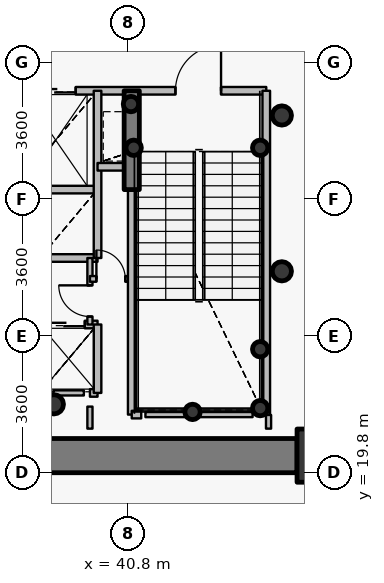
"""IFC4 building model, lengths in metres.
Left out: names, types, materials, properties, quantities, classifications, styles, units other than length and angle.
Written with IfcOpenShell. Run it as: python <this file> out.ifc"""

import sys

from ifc_helpers import new_model, si_unit, direction, frame, frame_2d, origin, origin_2d, place, context, subcontext, project, spatial, rectangle, hollow_circle, extrude, source, transform, mapped, element, fill, save


model = new_model("IFC4")
c1 = context("Model", 3, precision=1e-05, world=origin(), true_north=direction((0.0, 1.0)))
c2 = subcontext(c1, "Body", "Model", "MODEL_VIEW")
j1 = project(units=[si_unit("LENGTHUNIT", "METRE"), si_unit("PLANEANGLEUNIT", "RADIAN")], contexts=[c1])
p1 = place(None, origin())
s1 = spatial("IfcSite", under=j1, at=p1, CompositionType="ELEMENT")
p2 = place(p1, origin())
s2 = spatial("IfcBuilding", under=s1, at=p2, CompositionType="ELEMENT")
p3 = place(p2, frame((0.0, 0.0, 78.6)))
s3 = spatial("IfcBuildingStorey", under=s2, at=p3, CompositionType="ELEMENT", Elevation=78.6)
p4 = place(p3, frame((45.95, 20.25, 0.0), z_axis=(0.0, 0.0, 1.0), x_axis=(1.0, 0.0, 0.0)))
e1 = element("IfcColumn", 1, at=p4, inside=s3, PredefinedType="COLUMN", context=c2, shape_type="SweptSolid", body=[
    extrude(rectangle(XDim=1.4, YDim=1.4, at=origin_2d()), origin(), (0.0, 0.0, 1.0), 4.2),
])
p5 = place(p3, frame((38.85, 21.6, 0.0), z_axis=(0.0, 0.0, 1.0), x_axis=(1.0, 0.0, 0.0)))
e2 = element("IfcColumn", 2, at=p5, inside=s3, PredefinedType="COLUMN", context=c2, shape_type="SweptSolid", body=[
    extrude(hollow_circle(Radius=0.254, WallThickness=0.02, at=origin_2d()), origin(), (0.0, 0.0, 1.0), 4.2),
])
for number, where, z_axis, x_axis in (
    (3, (44.28, 21.5, 0.0), (0.0, 0.0, 1.0), (1.0, 0.0, 0.0)),
    (4, (44.28, 23.05, 0.0), (0.0, 0.0, 1.0), (1.0, 0.0, 0.0)),
    (5, (42.5, 21.4, 0.0), (0.0, 0.0, 1.0), (1.0, 0.0, 0.0)),
    (6, (40.95, 28.35, 0.0), (0.0, 0.0, 1.0), (1.0, 0.0, 0.0)),
    (7, (44.28, 28.35, 0.0), (0.0, 0.0, 1.0), (1.0, 0.0, 0.0)),
    (8, (40.88, 29.5, 0.0), (0.0, 0.0, 1.0), (1.0, 0.0, 0.0)),
):
    element("IfcColumn", number, at=place(p3, frame(where, z_axis=z_axis, x_axis=x_axis)), inside=s3, PredefinedType="COLUMN", context=c2, shape_type="SweptSolid", body=[
        extrude(hollow_circle(Radius=0.203, WallThickness=0.016, at=origin_2d()), origin(), (0.0, 0.0, 1.0), 4.2),
    ])
p6 = place(p3, frame((45.25, 20.25, 0.0), z_axis=(0.0, 0.0, 1.0), x_axis=(-1.0, 0.0, 0.0)))
e9 = element("IfcWall", 9, at=p6, inside=s3, PredefinedType="SHEAR", context=c2, shape_type="SweptSolid", body=[
    extrude(rectangle(XDim=18.5, YDim=0.9, at=frame_2d((9.25, 0.0))), origin(), (0.0, 0.0, 1.0), 3.4),
])
p7 = place(p6, frame((10.0, 0.0, 0.0)))
e10 = element("IfcOpeningElement", 10, at=p7, cuts=e9, PredefinedType="OPENING", context=c2, shape_type="SweptSolid", body=[
    extrude(rectangle(XDim=1.15, YDim=2.15, at=origin_2d()), frame((0.575, 0.46, 1.075), z_axis=(0.0, -1.0, 0.0), x_axis=(1.0, 0.0, 0.0)), (0.0, 0.0, 1.0), 0.92),
])
p8 = place(p3, frame((40.9, 27.25, 0.0), z_axis=(0.0, 0.0, 1.0), x_axis=(0.0, 1.0, 0.0)))
e11 = element("IfcWall", 11, at=p8, inside=s3, PredefinedType="SHEAR", context=c2, shape_type="SweptSolid", body=[
    extrude(rectangle(XDim=2.6, YDim=0.4, at=frame_2d((1.3, 0.0))), origin(), (0.0, 0.0, 1.0), 3.55),
])
for number, where, z_axis, x_axis in (
    (12, (44.85, 25.1, 0.0), (0.0, 0.0, 1.0), (1.0, 0.0, 0.0)),
    (13, (44.85, 29.2, 0.0), (0.0, 0.0, 1.0), (1.0, 0.0, 0.0)),
):
    element("IfcColumn", number, at=place(p3, frame(where, z_axis=z_axis, x_axis=x_axis)), inside=s3, PredefinedType="COLUMN", context=c2, shape_type="SweptSolid", body=[
        extrude(hollow_circle(Radius=0.254, WallThickness=0.02, at=origin_2d()), origin(), (0.0, 0.0, 1.0), 4.2),
    ])
p9 = place(p3, frame((35.05, 27.25, 0.0), z_axis=(0.0, 0.0, 1.0), x_axis=(1.0, 0.0, 0.0)))
e14 = element("IfcWall", 14, at=p9, inside=s3, PredefinedType="PARTITIONING", context=c2, shape_type="SweptSolid", body=[
    extrude(rectangle(XDim=4.95, YDim=0.2, at=frame_2d((2.475, 0.0))), origin(), (0.0, 0.0, 1.0), 3.535),
])
p10 = place(p3, frame((35.45, 23.7, 0.0), z_axis=(0.0, 0.0, 1.0), x_axis=(1.0, 0.0, 0.0)))
e15 = element("IfcWall", 15, at=p10, inside=s3, PredefinedType="PARTITIONING", context=c2, shape_type="SweptSolid", body=[
    extrude(rectangle(XDim=4.55, YDim=0.2, at=frame_2d((2.275, 0.0))), origin(), (0.0, 0.0, 1.0), 3.535),
])
p11 = place(p10, frame((0.25, 0.0, 0.0)))
e16 = element("IfcOpeningElement", 16, at=p11, cuts=e15, PredefinedType="OPENING", context=c2, shape_type="SweptSolid", body=[
    extrude(rectangle(XDim=1.05, YDim=2.15, at=origin_2d()), frame((0.525, 0.11, 1.075), z_axis=(0.0, -1.0, 0.0), x_axis=(1.0, 0.0, 0.0)), (0.0, 0.0, 1.0), 0.22),
])
p12 = place(p10, frame((1.745, 0.0, 0.0)))
e17 = element("IfcOpeningElement", 17, at=p12, cuts=e15, PredefinedType="OPENING", context=c2, shape_type="SweptSolid", body=[
    extrude(rectangle(XDim=1.05, YDim=2.15, at=origin_2d()), frame((0.525, 0.11, 1.075), z_axis=(0.0, -1.0, 0.0), x_axis=(1.0, 0.0, 0.0)), (0.0, 0.0, 1.0), 0.22),
])
p13 = place(p10, frame((3.165, 0.0, 0.0)))
e18 = element("IfcOpeningElement", 18, at=p13, cuts=e15, PredefinedType="OPENING", context=c2, shape_type="SweptSolid", body=[
    extrude(rectangle(XDim=1.05, YDim=2.15, at=origin_2d()), frame((0.525, 0.11, 1.075), z_axis=(0.0, -1.0, 0.0), x_axis=(1.0, 0.0, 0.0)), (0.0, 0.0, 1.0), 0.22),
])
p14 = place(p3, frame((35.45, 25.45, 0.0), z_axis=(0.0, 0.0, 1.0), x_axis=(1.0, 0.0, 0.0)))
e19 = element("IfcWall", 19, at=p14, inside=s3, PredefinedType="PARTITIONING", context=c2, shape_type="SweptSolid", body=[
    extrude(rectangle(XDim=4.55, YDim=0.2, at=frame_2d((2.275, 0.0))), origin(), (0.0, 0.0, 1.0), 3.535),
])
p15 = place(p3, frame((35.95, 29.85, 0.0), z_axis=(0.0, 0.0, 1.0), x_axis=(1.0, 0.0, 0.0)))
e20 = element("IfcWall", 20, at=p15, inside=s3, PredefinedType="PARTITIONING", context=c2, shape_type="SweptSolid", body=[
    extrude(rectangle(XDim=8.49, YDim=0.2, at=frame_2d((4.245, 0.0))), origin(), (0.0, 0.0, 1.0), 3.535),
])
p16 = place(p15, frame((6.1, 0.0, 0.0)))
e21 = element("IfcOpeningElement", 21, at=p16, cuts=e20, PredefinedType="OPENING", context=c2, shape_type="SweptSolid", body=[
    extrude(rectangle(XDim=1.2, YDim=2.15, at=origin_2d()), frame((0.6, 0.11, 1.075), z_axis=(0.0, -1.0, 0.0), x_axis=(1.0, 0.0, 0.0)), (0.0, 0.0, 1.0), 0.22),
])
p17 = place(p15, frame((0.37, 0.0, 0.0)))
e22 = element("IfcOpeningElement", 22, at=p17, cuts=e20, PredefinedType="OPENING", context=c2, shape_type="SweptSolid", body=[
    extrude(rectangle(XDim=1.15, YDim=2.15, at=origin_2d()), frame((0.575, 0.11, 1.075), z_axis=(0.0, -1.0, 0.0), x_axis=(1.0, 0.0, 0.0)), (0.0, 0.0, 1.0), 0.22),
])
p18 = place(p15, frame((2.425, 0.0, 0.0)))
e23 = element("IfcOpeningElement", 23, at=p18, cuts=e20, PredefinedType="OPENING", context=c2, shape_type="SweptSolid", body=[
    extrude(rectangle(XDim=1.05, YDim=2.15, at=origin_2d()), frame((0.525, 0.11, 1.075), z_axis=(0.0, -1.0, 0.0), x_axis=(1.0, 0.0, 0.0)), (0.0, 0.0, 1.0), 0.22),
])
p19 = place(p3, frame((39.8, 21.9, 0.0), z_axis=(0.0, 0.0, 1.0), x_axis=(1.0, 0.0, 0.0)))
e24 = element("IfcWall", 24, at=p19, inside=s3, PredefinedType="PARTITIONING", context=c2, shape_type="SweptSolid", body=[
    extrude(rectangle(XDim=0.2, YDim=0.2, at=frame_2d((0.1, 0.0))), origin(), (0.0, 0.0, 1.0), 3.95),
])
p20 = place(p3, frame((39.8, 23.7, 0.0), z_axis=(0.0, 0.0, 1.0), x_axis=(0.0, 1.0, 0.0)))
e25 = element("IfcWall", 25, at=p20, inside=s3, PredefinedType="PARTITIONING", context=c2, shape_type="SweptSolid", body=[
    extrude(rectangle(XDim=1.75, YDim=0.135, at=frame_2d((0.875, 0.0))), origin(), (0.0, 0.0, 1.0), 3.95),
])
p21 = place(p20, frame((0.21, 0.0, 0.0)))
e26 = element("IfcOpeningElement", 26, at=p21, cuts=e25, PredefinedType="OPENING", context=c2, shape_type="SweptSolid", body=[
    extrude(rectangle(XDim=0.82, YDim=2.1, at=origin_2d()), frame((0.41, 0.078, 1.05), z_axis=(0.0, -1.0, 0.0), x_axis=(1.0, 0.0, 0.0)), (0.0, 0.0, 1.0), 0.155),
])
p22 = place(p3, frame((39.8, 24.9, 0.0), z_axis=(0.0, 0.0, 1.0), x_axis=(1.0, 0.0, 0.0)))
e27 = element("IfcWall", 27, at=p22, inside=s3, PredefinedType="PARTITIONING", context=c2, shape_type="SweptSolid", body=[
    extrude(rectangle(XDim=1.1, YDim=0.15, at=frame_2d((0.55, 0.0))), origin(), (0.0, 0.0, 1.0), 3.95),
])
p23 = place(p22, frame((0.17, 0.0, 0.0)))
e28 = element("IfcOpeningElement", 28, at=p23, cuts=e27, PredefinedType="OPENING", context=c2, shape_type="SweptSolid", body=[
    extrude(rectangle(XDim=0.76, YDim=2.1, at=origin_2d()), frame((0.38, 0.085, 1.05), z_axis=(0.0, -1.0, 0.0), x_axis=(1.0, 0.0, 0.0)), (0.0, 0.0, 1.0), 0.17),
])
p24 = place(p3, frame((40.0, 21.9, 0.0), z_axis=(0.0, 0.0, 1.0), x_axis=(0.0, 1.0, 0.0)))
e29 = element("IfcWall", 29, at=p24, inside=s3, PredefinedType="PARTITIONING", context=c2, shape_type="SweptSolid", body=[
    extrude(rectangle(XDim=1.8, YDim=0.2, at=frame_2d((0.9, 0.0))), origin(), (0.0, 0.0, 1.0), 3.95),
])
p25 = place(p3, frame((40.0, 25.45, 0.0), z_axis=(0.0, 0.0, 1.0), x_axis=(0.0, 1.0, 0.0)))
e30 = element("IfcWall", 30, at=p25, inside=s3, PredefinedType="PARTITIONING", context=c2, shape_type="SweptSolid", body=[
    extrude(rectangle(XDim=4.4, YDim=0.2, at=frame_2d((2.2, 0.0))), origin(), (0.0, 0.0, 1.0), 3.95),
])
p26 = place(p3, frame((40.0, 27.85, 0.0), z_axis=(0.0, 0.0, 1.0), x_axis=(1.0, 0.0, 0.0)))
e31 = element("IfcWall", 31, at=p26, inside=s3, PredefinedType="PARTITIONING", context=c2, shape_type="SweptSolid", body=[
    extrude(rectangle(XDim=0.9, YDim=0.2, at=frame_2d((0.45, 0.0))), origin(), (0.0, 0.0, 1.0), 3.95),
])
p27 = place(p3, frame((40.9, 21.33, 0.0), z_axis=(0.0, 0.0, 1.0), x_axis=(0.0, 1.0, 0.0)))
e32 = element("IfcWall", 32, at=p27, inside=s3, PredefinedType="PARTITIONING", context=c2, shape_type="SweptSolid", body=[
    extrude(rectangle(XDim=5.91, YDim=0.2, at=frame_2d((2.955, 0.0))), origin(), (0.0, 0.0, 1.0), 3.485),
])
p28 = place(p3, frame((40.9, 21.33, 0.0), z_axis=(0.0, 0.0, 1.0), x_axis=(1.0, 0.0, 0.0)))
e33 = element("IfcWall", 33, at=p28, inside=s3, PredefinedType="PARTITIONING", context=c2, shape_type="SweptSolid", body=[
    extrude(rectangle(XDim=0.25, YDim=0.2, at=frame_2d((0.125, 0.0))), origin(), (0.0, 0.0, 1.0), 3.485),
])
p29 = place(p3, frame((44.44, 21.33, 0.0), z_axis=(0.0, 0.0, 1.0), x_axis=(0.0, 1.0, 0.0)))
e34 = element("IfcWall", 34, at=p29, inside=s3, PredefinedType="PARTITIONING", context=c2, shape_type="SweptSolid", body=[
    extrude(rectangle(XDim=8.52, YDim=0.2, at=frame_2d((4.26, 0.0))), origin(), (0.0, 0.0, 1.0), 3.95),
])
p30 = place(p3, frame((44.08, 21.33, 0.0), z_axis=(0.0, 0.0, 1.0), x_axis=(-1.0, 0.0, 0.0)))
e35 = element("IfcWall", 35, at=p30, inside=s3, PredefinedType="PARTITIONING", context=c2, shape_type="SweptSolid", body=[
    extrude(rectangle(XDim=2.82, YDim=0.135, at=frame_2d((1.41, 0.0))), origin(), (0.0, 0.0, 1.0), 3.485),
])
p31 = place(p3, frame((39.64, 21.9, 0.0), z_axis=(0.0, 0.0, 1.0), x_axis=(-1.0, 0.0, 0.0)))
e36 = element("IfcWall", 36, at=p31, inside=s3, PredefinedType="PARTITIONING", context=c2, shape_type="SweptSolid", body=[
    extrude(rectangle(XDim=0.8, YDim=0.135, at=frame_2d((0.4, 0.0))), origin(), (0.0, 0.0, 1.0), 3.535),
])
p32 = place(p3, frame((39.8, 20.96, 0.0), z_axis=(0.0, 0.0, 1.0), x_axis=(0.0, 1.0, 0.0)))
e37 = element("IfcWall", 37, at=p32, inside=s3, PredefinedType="PARTITIONING", context=c2, shape_type="SweptSolid", body=[
    extrude(rectangle(XDim=0.58, YDim=0.135, at=frame_2d((0.29, 0.0))), origin(), (0.0, 0.0, 1.0), 3.485),
])
p33 = place(p3, frame((44.5, 20.96, 0.0), z_axis=(0.0, 0.0, 1.0), x_axis=(0.0, 1.0, 0.0)))
e38 = element("IfcWall", 38, at=p33, inside=s3, PredefinedType="PARTITIONING", context=c2, shape_type="SweptSolid", body=[
    extrude(rectangle(XDim=0.36, YDim=0.135, at=frame_2d((0.18, 0.0))), origin(), (0.0, 0.0, 1.0), 3.95),
])
p34 = place(p3, frame((45.26, 19.8, 0.0), z_axis=(0.0, 0.0, 1.0), x_axis=(1.0, 0.0, 0.0)))
e39 = element("IfcWall", 39, at=p34, inside=s3, PredefinedType="PARTITIONING", context=c2, shape_type="SweptSolid", body=[
    extrude(rectangle(XDim=1.14, YDim=0.135, at=frame_2d((0.57, 0.0))), origin(), (0.0, 0.0, 1.0), 3.285),
])
m1 = source(origin(), c2, "Body", "SweptSolid", [
    extrude(rectangle(XDim=1.2, YDim=2.15, at=origin_2d()), frame((0.6, 0.025, 1.075), z_axis=(0.0, -1.0, 0.0), x_axis=(1.0, 0.0, 0.0)), (0.0, 0.0, 1.0), 0.05),
])
p35 = place(p16, origin())
e40 = element("IfcDoor", 40, at=p35, inside=s3, OperationType="SINGLE_SWING_RIGHT", PredefinedType="DOOR", context=c2, shape_type="MappedRepresentation", body=[
    mapped(m1, transform((0.0, 0.0, 0.0), x_axis=(1.0, 0.0, 0.0), y_axis=(0.0, 1.0, 0.0), z_axis=(0.0, 0.0, 1.0), scale=1.0)),
])
fill(e21, e40)
m2 = source(origin(), c2, "Body", "SweptSolid", [
    extrude(rectangle(XDim=1.05, YDim=2.15, at=origin_2d()), frame((0.525, 0.025, 1.075), z_axis=(0.0, -1.0, 0.0), x_axis=(1.0, 0.0, 0.0)), (0.0, 0.0, 1.0), 0.05),
])
p36 = place(p18, origin())
e41 = element("IfcDoor", 41, at=p36, inside=s3, OperationType="DOUBLE_DOOR_SLIDING", PredefinedType="USERDEFINED", context=c2, shape_type="MappedRepresentation", body=[
    mapped(m2, transform((0.0, 0.0, 0.0), x_axis=(1.0, 0.0, 0.0), y_axis=(0.0, 1.0, 0.0), z_axis=(0.0, 0.0, 1.0), scale=1.0)),
])
fill(e23, e41)
p37 = place(p13, origin())
e42 = element("IfcDoor", 42, at=p37, inside=s3, OperationType="DOUBLE_DOOR_SLIDING", PredefinedType="USERDEFINED", context=c2, shape_type="MappedRepresentation", body=[
    mapped(m2, transform((0.0, 0.0, 0.0), x_axis=(1.0, 0.0, 0.0), y_axis=(0.0, 1.0, 0.0), z_axis=(0.0, 0.0, 1.0), scale=1.0)),
])
fill(e18, e42)
m3 = source(origin(), c2, "Body", "SweptSolid", [
    extrude(rectangle(XDim=0.82, YDim=2.1, at=origin_2d()), frame((0.41, 0.025, 1.05), z_axis=(0.0, -1.0, 0.0), x_axis=(1.0, 0.0, 0.0)), (0.0, 0.0, 1.0), 0.05),
])
p38 = place(p21, origin())
e43 = element("IfcDoor", 43, at=p38, inside=s3, OperationType="SINGLE_SWING_RIGHT", PredefinedType="DOOR", context=c2, shape_type="MappedRepresentation", body=[
    mapped(m3, transform((0.0, 0.0, 0.0), x_axis=(1.0, 0.0, 0.0), y_axis=(0.0, 1.0, 0.0), z_axis=(0.0, 0.0, 1.0), scale=1.0)),
])
fill(e26, e43)
m4 = source(origin(), c2, "Body", "SweptSolid", [
    extrude(rectangle(XDim=0.76, YDim=2.1, at=origin_2d()), frame((0.38, 0.025, 1.05), z_axis=(0.0, -1.0, 0.0), x_axis=(1.0, 0.0, 0.0)), (0.0, 0.0, 1.0), 0.05),
])
p39 = place(p23, origin())
e44 = element("IfcDoor", 44, at=p39, inside=s3, OperationType="SINGLE_SWING_LEFT", PredefinedType="DOOR", context=c2, shape_type="MappedRepresentation", body=[
    mapped(m4, transform((0.0, 0.0, 0.0), x_axis=(1.0, 0.0, 0.0), y_axis=(0.0, 1.0, 0.0), z_axis=(0.0, 0.0, 1.0), scale=1.0)),
])
fill(e28, e44)
save(model, sys.argv[1])
